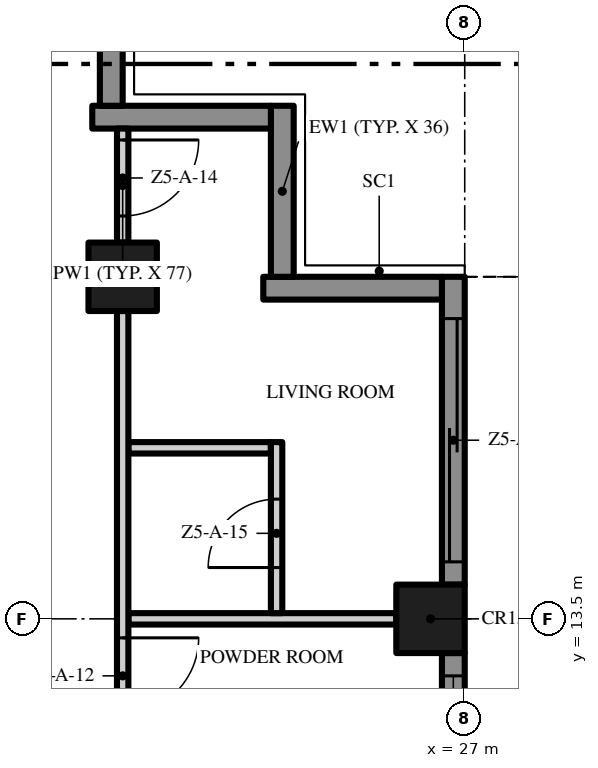
"""IFC4 building model, lengths in metres.
Left out: names, types, materials, properties, quantities, classifications, styles, units other than length and angle.
Written with IfcOpenShell. Run it as: python <this file> out.ifc"""

import sys

from ifc_helpers import new_model, si_unit, direction, frame, frame_2d, origin, origin_2d, place, context, subcontext, project, spatial, polyline, rectangle, outline, extrude, element, fill, save


model = new_model("IFC4")
c1 = context("Model", 3, precision=1e-05, world=origin(), true_north=direction((0.0, 1.0)))
c2 = subcontext(c1, "Body", "Model", "MODEL_VIEW")
j1 = project(units=[si_unit("LENGTHUNIT", "METRE"), si_unit("PLANEANGLEUNIT", "RADIAN")], contexts=[c1])
p1 = place(None, origin())
s1 = spatial("IfcSite", under=j1, at=p1, CompositionType="ELEMENT")
p2 = place(p1, origin())
s2 = spatial("IfcBuilding", under=s1, at=p2, CompositionType="ELEMENT")
p3 = place(p2, frame((0.0, 0.0, 238.8)))
s3 = spatial("IfcBuildingStorey", under=s2, at=p3, CompositionType="ELEMENT", Elevation=238.8)
for number, where, z_axis, x_axis in (
    (1, (26.55, 13.5, 0.0), (0.0, 0.0, 1.0), (1.0, 0.0, 0.0)),
    (2, (22.5, 18.0, 0.0), (0.0, 0.0, 1.0), (1.0, 0.0, 0.0)),
):
    element("IfcColumn", number, at=place(p3, frame(where, z_axis=z_axis, x_axis=x_axis)), inside=s3, PredefinedType="COLUMN", context=c2, shape_type="SweptSolid", body=[
        extrude(rectangle(XDim=0.9, YDim=0.9, at=origin_2d()), origin(), (0.0, 0.0, 1.0), 3.5),
    ])
p4 = place(p3, frame((26.85, 13.05, 0.0), z_axis=(0.0, 0.0, 1.0), x_axis=(0.0, -1.0, 0.0)))
e3 = element("IfcWall", 3, at=p4, inside=s3, PredefinedType="SOLIDWALL", context=c2, shape_type="SweptSolid", body=[
    extrude(rectangle(XDim=8.1, YDim=0.3, at=frame_2d((4.05, 0.0))), origin(), (0.0, 0.0, 1.0), 3.5),
])
p5 = place(p4, frame((4.6, 0.0, 0.45)))
e4 = element("IfcOpeningElement", 4, at=p5, cuts=e3, PredefinedType="OPENING", context=c2, shape_type="SweptSolid", body=[
    extrude(rectangle(XDim=3.2, YDim=2.65, at=frame_2d((1.6, 1.325))), frame((0.0, 0.16, 0.0), z_axis=(0.0, -1.0, 0.0), x_axis=(1.0, 0.0, 0.0)), (0.0, 0.0, 1.0), 0.32),
])
p6 = place(p4, frame((0.3, 0.0, 0.45)))
e5 = element("IfcOpeningElement", 5, at=p6, cuts=e3, PredefinedType="OPENING", context=c2, shape_type="SweptSolid", body=[
    extrude(rectangle(XDim=3.2, YDim=2.65, at=frame_2d((1.6, 1.325))), frame((0.0, 0.16, 0.0), z_axis=(0.0, -1.0, 0.0), x_axis=(1.0, 0.0, 0.0)), (0.0, 0.0, 1.0), 0.32),
])
p7 = place(p3, frame((26.85, 18.0, 0.0), z_axis=(0.0, 0.0, 1.0), x_axis=(0.0, -1.0, 0.0)))
e6 = element("IfcWall", 6, at=p7, inside=s3, PredefinedType="SOLIDWALL", context=c2, shape_type="SweptSolid", body=[
    extrude(rectangle(XDim=4.05, YDim=0.3, at=frame_2d((2.025, 0.0))), origin(), (0.0, 0.0, 1.0), 3.5),
])
p8 = place(p7, frame((0.55, 0.0, 0.0)))
e7 = element("IfcOpeningElement", 7, at=p8, cuts=e6, PredefinedType="OPENING", context=c2, shape_type="SweptSolid", body=[
    extrude(rectangle(XDim=3.2, YDim=2.4, at=frame_2d((1.6, 1.2))), frame((0.0, 0.16, 0.0), z_axis=(0.0, -1.0, 0.0), x_axis=(1.0, 0.0, 0.0)), (0.0, 0.0, 1.0), 0.32),
])
p9 = place(p3, frame((24.35, 17.85, 0.0), z_axis=(0.0, 0.0, 1.0), x_axis=(1.0, 0.0, 0.0)))
e8 = element("IfcWall", 8, at=p9, inside=s3, PredefinedType="SOLIDWALL", context=c2, shape_type="SweptSolid", body=[
    extrude(rectangle(XDim=2.35, YDim=0.3, at=frame_2d((1.175, 0.0))), origin(), (0.0, 0.0, 1.0), 3.5),
])
p10 = place(p3, frame((24.6, 20.25, 0.0), z_axis=(0.0, 0.0, 1.0), x_axis=(0.0, -1.0, 0.0)))
e9 = element("IfcWall", 9, at=p10, inside=s3, PredefinedType="SOLIDWALL", context=c2, shape_type="SweptSolid", body=[
    extrude(rectangle(XDim=2.25, YDim=0.3, at=frame_2d((1.125, 0.0))), origin(), (0.0, 0.0, 1.0), 3.5),
])
p11 = place(p3, frame((22.1, 20.1, 0.0), z_axis=(0.0, 0.0, 1.0), x_axis=(1.0, 0.0, 0.0)))
e10 = element("IfcWall", 10, at=p11, inside=s3, PredefinedType="SOLIDWALL", context=c2, shape_type="SweptSolid", body=[
    extrude(rectangle(XDim=2.35, YDim=0.3, at=frame_2d((1.175, 0.0))), origin(), (0.0, 0.0, 1.0), 3.5),
])
p12 = place(p3, frame((22.35, 22.5, 0.0), z_axis=(0.0, 0.0, 1.0), x_axis=(0.0, -1.0, 0.0)))
e11 = element("IfcWall", 11, at=p12, inside=s3, PredefinedType="SOLIDWALL", context=c2, shape_type="SweptSolid", body=[
    extrude(rectangle(XDim=2.25, YDim=0.3, at=frame_2d((1.125, 0.0))), origin(), (0.0, 0.0, 1.0), 3.5),
])
p13 = place(p3, origin())
e12 = element("IfcWall", 12, at=p13, inside=s3, PredefinedType="USERDEFINED", context=c2, shape_type="SweptSolid", body=[
    extrude(outline(polyline([(27.951, -18.0), (28.612, -16.5), (29.345, -15.0), (29.869, -13.5), (30.0, -12.375), (29.985, -12.0), (29.649, -10.5), (28.988, -9.0), (28.255, -7.5), (27.731, -6.0), (27.6, -4.875), (27.615, -4.5), (27.951, -3.0), (28.612, -1.5), (29.345, 0.0), (29.869, 1.5), (30.0, 2.625), (29.985, 3.0), (29.649, 4.5), (28.988, 6.0), (28.255, 7.5), (27.731, 9.0), (27.6, 10.125), (27.615, 10.5), (27.951, 12.0), (28.612, 13.5), (29.345, 15.0), (29.869, 16.5), (30.0, 17.625), (29.985, 18.0), (29.735, 17.99), (29.749, 17.635), (29.624, 16.556), (29.114, 15.096), (28.385, 13.605), (27.713, 12.079), (27.366, 10.533), (27.349, 10.115), (27.486, 8.944), (28.024, 7.404), (28.761, 5.895), (29.41, 4.421), (29.736, 2.967), (29.749, 2.635), (29.624, 1.556), (29.114, 0.096), (28.385, -1.395), (27.713, -2.921), (27.366, -4.467), (27.349, -4.885), (27.486, -6.056), (28.024, -7.596), (28.761, -9.105), (29.41, -10.579), (29.736, -12.033), (29.749, -12.365), (29.624, -13.444), (29.114, -14.904), (28.385, -16.395), (27.723, -17.899), (27.951, -18.0)])), origin(), (0.0, 0.0, 1.0), 0.9),
])
p14 = place(p3, frame((22.575, 13.5, 0.0), z_axis=(0.0, 0.0, 1.0), x_axis=(1.0, 0.0, 0.0)))
e13 = element("IfcWall", 13, at=p14, inside=s3, PredefinedType="PARTITIONING", context=c2, shape_type="SweptSolid", body=[
    extrude(rectangle(XDim=3.525, YDim=0.15, at=frame_2d((1.762, 0.0))), origin(), (0.0, 0.0, 1.0), 3.5),
])
p15 = place(p3, frame((22.575, 15.75, 0.0), z_axis=(0.0, 0.0, 1.0), x_axis=(1.0, 0.0, 0.0)))
e14 = element("IfcWall", 14, at=p15, inside=s3, PredefinedType="PARTITIONING", context=c2, shape_type="SweptSolid", body=[
    extrude(rectangle(XDim=1.875, YDim=0.15, at=frame_2d((0.938, 0.0))), origin(), (0.0, 0.0, 1.0), 3.5),
])
p16 = place(p3, frame((22.5, 17.55, 0.0), z_axis=(0.0, 0.0, 1.0), x_axis=(0.0, -1.0, 0.0)))
e15 = element("IfcWall", 15, at=p16, inside=s3, PredefinedType="PARTITIONING", context=c2, shape_type="SweptSolid", body=[
    extrude(rectangle(XDim=17.45, YDim=0.15, at=frame_2d((8.725, 0.0))), origin(), (0.0, 0.0, 1.0), 3.5),
])
p17 = place(p16, frame((14.8, 0.0, 0.0)))
e16 = element("IfcOpeningElement", 16, at=p17, cuts=e15, PredefinedType="OPENING", context=c2, shape_type="SweptSolid", body=[
    extrude(rectangle(XDim=1.0, YDim=2.4, at=frame_2d((0.5, 1.2))), frame((0.0, 0.085, 0.0), z_axis=(0.0, -1.0, 0.0), x_axis=(1.0, 0.0, 0.0)), (0.0, 0.0, 1.0), 0.17),
])
p18 = place(p16, frame((11.45, 0.0, 0.0)))
e17 = element("IfcOpeningElement", 17, at=p18, cuts=e15, PredefinedType="OPENING", context=c2, shape_type="SweptSolid", body=[
    extrude(rectangle(XDim=1.0, YDim=2.4, at=frame_2d((0.5, 1.2))), frame((0.0, 0.085, 0.0), z_axis=(0.0, -1.0, 0.0), x_axis=(1.0, 0.0, 0.0)), (0.0, 0.0, 1.0), 0.17),
])
p19 = place(p16, frame((4.3, 0.0, 0.0)))
e18 = element("IfcOpeningElement", 18, at=p19, cuts=e15, PredefinedType="OPENING", context=c2, shape_type="SweptSolid", body=[
    extrude(rectangle(XDim=1.0, YDim=2.4, at=frame_2d((0.5, 1.2))), frame((0.0, 0.085, 0.0), z_axis=(0.0, -1.0, 0.0), x_axis=(1.0, 0.0, 0.0)), (0.0, 0.0, 1.0), 0.17),
])
p20 = place(p3, frame((22.5, 19.95, 0.0), z_axis=(0.0, 0.0, 1.0), x_axis=(0.0, -1.0, 0.0)))
e19 = element("IfcWall", 19, at=p20, inside=s3, PredefinedType="PARTITIONING", context=c2, shape_type="SweptSolid", body=[
    extrude(rectangle(XDim=1.5, YDim=0.15, at=frame_2d((0.75, 0.0))), origin(), (0.0, 0.0, 1.0), 3.5),
])
p21 = place(p20, frame((0.15, 0.0, 0.0)))
e20 = element("IfcOpeningElement", 20, at=p21, cuts=e19, PredefinedType="OPENING", context=c2, shape_type="SweptSolid", body=[
    extrude(rectangle(XDim=1.0, YDim=2.4, at=frame_2d((0.5, 1.2))), frame((0.0, 0.085, 0.0), z_axis=(0.0, -1.0, 0.0), x_axis=(1.0, 0.0, 0.0)), (0.0, 0.0, 1.0), 0.17),
])
p22 = place(p3, frame((24.525, 13.575, 0.0), z_axis=(0.0, 0.0, 1.0), x_axis=(0.0, 1.0, 0.0)))
e21 = element("IfcWall", 21, at=p22, inside=s3, PredefinedType="PARTITIONING", context=c2, shape_type="SweptSolid", body=[
    extrude(rectangle(XDim=2.25, YDim=0.15, at=frame_2d((1.125, 0.0))), origin(), (0.0, 0.0, 1.0), 3.5),
])
p23 = place(p22, frame((0.6, 0.0, 0.0)))
e22 = element("IfcOpeningElement", 22, at=p23, cuts=e21, PredefinedType="OPENING", context=c2, shape_type="SweptSolid", body=[
    extrude(rectangle(XDim=0.9, YDim=2.1, at=frame_2d((0.45, 1.05))), frame((0.0, 0.085, 0.0), z_axis=(0.0, -1.0, 0.0), x_axis=(1.0, 0.0, 0.0)), (0.0, 0.0, 1.0), 0.17),
])
p24 = place(p6, origin())
e23 = element("IfcWindow", 23, at=p24, inside=s3, PartitioningType="SINGLE_PANEL", PredefinedType="WINDOW", context=c2, shape_type="SweptSolid", body=[
    extrude(rectangle(XDim=3.2, YDim=2.65, at=frame_2d((1.6, 1.325))), frame((0.0, 0.03, 0.0), z_axis=(0.0, -1.0, 0.0), x_axis=(1.0, 0.0, 0.0)), (0.0, 0.0, 1.0), 0.06),
])
fill(e5, e23)
p25 = place(p8, origin())
e24 = element("IfcDoor", 24, at=p25, inside=s3, OperationType="SINGLE_SWING_LEFT", PredefinedType="DOOR", context=c2, shape_type="SweptSolid", body=[
    extrude(rectangle(XDim=3.2, YDim=2.4, at=frame_2d((1.6, 1.2))), frame((0.0, 0.025, 0.0), z_axis=(0.0, -1.0, 0.0), x_axis=(1.0, 0.0, 0.0)), (0.0, 0.0, 1.0), 0.05),
])
fill(e7, e24)
p26 = place(p19, origin())
e25 = element("IfcDoor", 25, at=p26, inside=s3, OperationType="SINGLE_SWING_LEFT", PredefinedType="DOOR", context=c2, shape_type="SweptSolid", body=[
    extrude(rectangle(XDim=1.0, YDim=2.4, at=frame_2d((0.5, 1.2))), frame((0.0, 0.025, 0.0), z_axis=(0.0, -1.0, 0.0), x_axis=(1.0, 0.0, 0.0)), (0.0, 0.0, 1.0), 0.05),
])
fill(e18, e25)
p27 = place(p21, origin())
e26 = element("IfcDoor", 26, at=p27, inside=s3, OperationType="SINGLE_SWING_LEFT", PredefinedType="DOOR", context=c2, shape_type="SweptSolid", body=[
    extrude(rectangle(XDim=1.0, YDim=2.4, at=frame_2d((0.5, 1.2))), frame((0.0, 0.025, 0.0), z_axis=(0.0, -1.0, 0.0), x_axis=(1.0, 0.0, 0.0)), (0.0, 0.0, 1.0), 0.05),
])
fill(e20, e26)
p28 = place(p23, origin())
e27 = element("IfcDoor", 27, at=p28, inside=s3, OperationType="SINGLE_SWING_LEFT", PredefinedType="DOOR", context=c2, shape_type="SweptSolid", body=[
    extrude(rectangle(XDim=0.9, YDim=2.1, at=frame_2d((0.45, 1.05))), frame((0.0, 0.025, 0.0), z_axis=(0.0, -1.0, 0.0), x_axis=(1.0, 0.0, 0.0)), (0.0, 0.0, 1.0), 0.05),
])
fill(e22, e27)
save(model, sys.argv[1])
